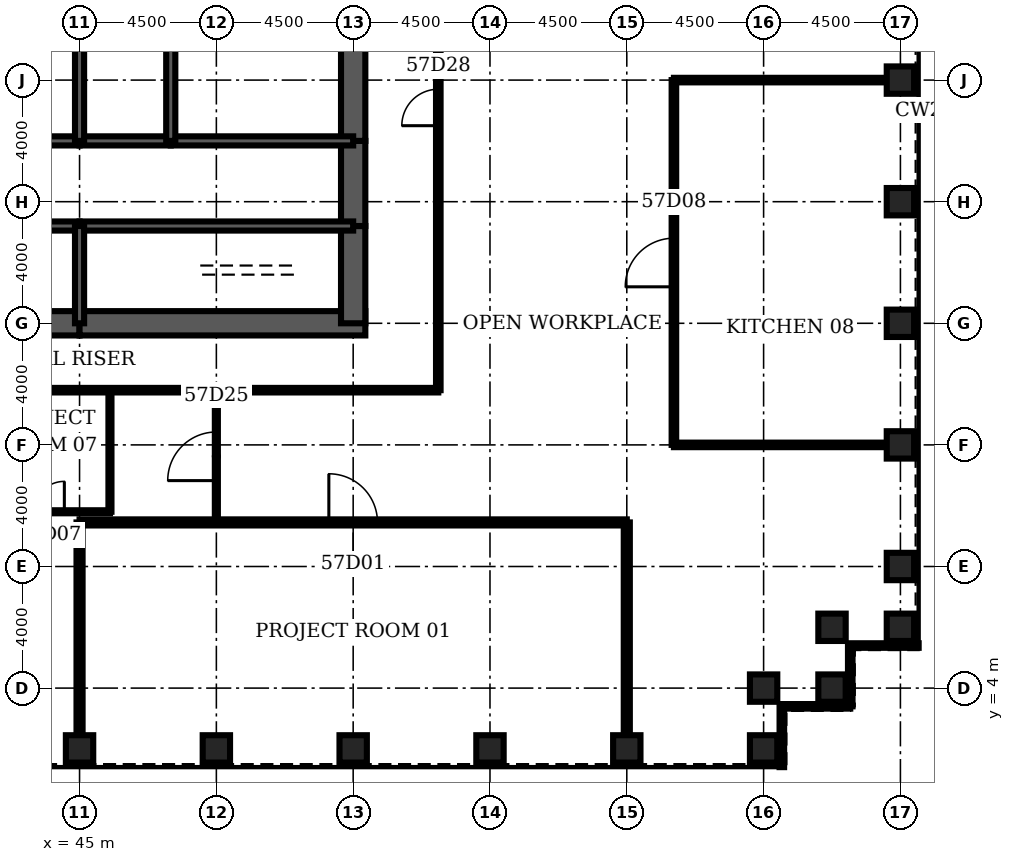
"""IFC4 building model, lengths in metres.
Left out: names, types, materials, properties, quantities, classifications, styles, units other than length and angle.
Written with IfcOpenShell. Run it as: python <this file> out.ifc"""

import sys

from ifc_helpers import new_model, si_unit, direction, frame, frame_2d, origin, origin_2d, place, context, subcontext, project, spatial, rectangle, hollow_rectangle, extrude, element, fill, save


model = new_model("IFC4")
c1 = context("Model", 3, precision=1e-05, world=origin(), true_north=direction((0.0, 1.0)))
c2 = subcontext(c1, "Body", "Model", "MODEL_VIEW")
j1 = project(units=[si_unit("LENGTHUNIT", "METRE"), si_unit("PLANEANGLEUNIT", "RADIAN")], contexts=[c1])
p1 = place(None, origin())
s1 = spatial("IfcSite", under=j1, at=p1, CompositionType="ELEMENT")
p2 = place(p1, origin())
s2 = spatial("IfcBuilding", under=s1, at=p2, CompositionType="ELEMENT")
p3 = place(p2, frame((0.0, 0.0, 253.0)))
s3 = spatial("IfcBuildingStorey", under=s2, at=p3, CompositionType="ELEMENT", Elevation=253.0)
for number, where, z_axis, x_axis in (
    (1, (45.0, 2.0, 0.0), (0.0, 0.0, 1.0), (0.0, 1.0, 0.0)),
    (2, (49.5, 2.0, 0.0), (0.0, 0.0, 1.0), (0.0, 1.0, 0.0)),
    (3, (54.0, 2.0, 0.0), (0.0, 0.0, 1.0), (0.0, 1.0, 0.0)),
    (4, (58.5, 2.0, 0.0), (0.0, 0.0, 1.0), (0.0, 1.0, 0.0)),
    (5, (63.0, 2.0, 0.0), (0.0, 0.0, 1.0), (0.0, 1.0, 0.0)),
    (6, (67.5, 2.0, 0.0), (0.0, 0.0, 1.0), (0.0, 1.0, 0.0)),
    (7, (67.5, 4.0, 0.0), (0.0, 0.0, 1.0), (0.0, 1.0, 0.0)),
    (8, (69.75, 4.0, 0.0), (0.0, 0.0, 1.0), (1.0, 0.0, 0.0)),
    (9, (69.75, 6.0, 0.0), (0.0, 0.0, 1.0), (1.0, 0.0, 0.0)),
    (10, (72.0, 6.0, 0.0), (0.0, 0.0, 1.0), (1.0, 0.0, 0.0)),
    (11, (72.0, 8.0, 0.0), (0.0, 0.0, 1.0), (1.0, 0.0, 0.0)),
    (12, (72.0, 12.0, 0.0), (0.0, 0.0, 1.0), (1.0, 0.0, 0.0)),
    (13, (72.0, 16.0, 0.0), (0.0, 0.0, 1.0), (1.0, 0.0, 0.0)),
    (14, (72.0, 20.0, 0.0), (0.0, 0.0, 1.0), (1.0, 0.0, 0.0)),
    (15, (72.0, 24.0, 0.0), (0.0, 0.0, 1.0), (1.0, 0.0, 0.0)),
):
    element("IfcColumn", number, at=place(p3, frame(where, z_axis=z_axis, x_axis=x_axis)), inside=s3, PredefinedType="COLUMN", context=c2, shape_type="SweptSolid", body=[
        extrude(hollow_rectangle(XDim=0.9, YDim=0.9, WallThickness=0.07, at=origin_2d()), origin(), (0.0, 0.0, 1.0), 4.2),
    ])
p4 = place(p3, frame((42.0, 16.0, 0.0), z_axis=(0.0, 0.0, 1.0), x_axis=(1.0, 0.0, 0.0)))
e16 = element("IfcWall", 16, at=p4, inside=s3, PredefinedType="SHEAR", context=c2, shape_type="SweptSolid", body=[
    extrude(rectangle(XDim=3.0, YDim=0.8, at=frame_2d((1.5, 0.0))), origin(), (0.0, 0.0, 1.0), 4.2),
])
p5 = place(p3, frame((45.0, 16.0, 0.0), z_axis=(0.0, 0.0, 1.0), x_axis=(1.0, 0.0, 0.0)))
e17 = element("IfcWall", 17, at=p5, inside=s3, PredefinedType="SHEAR", context=c2, shape_type="SweptSolid", body=[
    extrude(rectangle(XDim=9.4, YDim=0.8, at=frame_2d((4.7, 0.0))), origin(), (0.0, 0.0, 1.0), 4.2),
])
p6 = place(p3, frame((54.0, 16.0, 0.0), z_axis=(0.0, 0.0, 1.0), x_axis=(0.0, 1.0, 0.0)))
e18 = element("IfcWall", 18, at=p6, inside=s3, PredefinedType="SHEAR", context=c2, shape_type="SweptSolid", body=[
    extrude(rectangle(XDim=3.2, YDim=0.8, at=frame_2d((1.6, 0.0))), origin(), (0.0, 0.0, 1.0), 4.2),
])
p7 = place(p3, frame((54.0, 19.2, 0.0), z_axis=(0.0, 0.0, 1.0), x_axis=(0.0, 1.0, 0.0)))
e19 = element("IfcWall", 19, at=p7, inside=s3, PredefinedType="SHEAR", context=c2, shape_type="SweptSolid", body=[
    extrude(rectangle(XDim=2.8, YDim=0.8, at=frame_2d((1.4, 0.0))), origin(), (0.0, 0.0, 1.0), 4.2),
])
p8 = place(p7, frame((0.4, 0.0, 0.0)))
e20 = element("IfcOpeningElement", 20, at=p8, cuts=e19, PredefinedType="OPENING", context=c2, shape_type="SweptSolid", body=[
    extrude(rectangle(XDim=1.8, YDim=2.1, at=frame_2d((0.9, 1.05))), frame((0.0, 0.41, 0.0), z_axis=(0.0, -1.0, 0.0), x_axis=(1.0, 0.0, 0.0)), (0.0, 0.0, 1.0), 0.82),
])
p9 = place(p3, frame((54.0, 22.0, 0.0), z_axis=(0.0, 0.0, 1.0), x_axis=(0.0, 1.0, 0.0)))
e21 = element("IfcWall", 21, at=p9, inside=s3, PredefinedType="SHEAR", context=c2, shape_type="SweptSolid", body=[
    extrude(rectangle(XDim=4.0, YDim=0.8, at=frame_2d((2.0, 0.0))), origin(), (0.0, 0.0, 1.0), 4.2),
])
p10 = place(p3, frame((42.0, 19.2, 0.0), z_axis=(0.0, 0.0, 1.0), x_axis=(1.0, 0.0, 0.0)))
e22 = element("IfcWall", 22, at=p10, inside=s3, PredefinedType="SOLIDWALL", context=c2, shape_type="SweptSolid", body=[
    extrude(rectangle(XDim=3.0, YDim=0.3, at=frame_2d((1.5, 0.0))), origin(), (0.0, 0.0, 1.0), 4.2),
])
p11 = place(p10, frame((1.0, 0.0, 0.0)))
e23 = element("IfcOpeningElement", 23, at=p11, cuts=e22, PredefinedType="OPENING", context=c2, shape_type="SweptSolid", body=[
    extrude(rectangle(XDim=1.0, YDim=2.1, at=frame_2d((0.5, 1.05))), frame((0.0, 0.16, 0.0), z_axis=(0.0, -1.0, 0.0), x_axis=(1.0, 0.0, 0.0)), (0.0, 0.0, 1.0), 0.32),
])
p12 = place(p3, frame((45.0, 19.2, 0.0), z_axis=(0.0, 0.0, 1.0), x_axis=(1.0, 0.0, 0.0)))
e24 = element("IfcWall", 24, at=p12, inside=s3, PredefinedType="SOLIDWALL", context=c2, shape_type="SweptSolid", body=[
    extrude(rectangle(XDim=9.0, YDim=0.3, at=frame_2d((4.5, 0.0))), origin(), (0.0, 0.0, 1.0), 4.2),
])
p13 = place(p12, frame((7.35, 0.0, 0.0)))
e25 = element("IfcOpeningElement", 25, at=p13, cuts=e24, PredefinedType="OPENING", context=c2, shape_type="SweptSolid", body=[
    extrude(rectangle(XDim=1.0, YDim=2.1, at=frame_2d((0.5, 1.05))), frame((0.0, 0.16, 0.0), z_axis=(0.0, -1.0, 0.0), x_axis=(1.0, 0.0, 0.0)), (0.0, 0.0, 1.0), 0.32),
])
p14 = place(p3, frame((36.0, 22.0, 0.0), z_axis=(0.0, 0.0, 1.0), x_axis=(1.0, 0.0, 0.0)))
e26 = element("IfcWall", 26, at=p14, inside=s3, PredefinedType="SOLIDWALL", context=c2, shape_type="SweptSolid", body=[
    extrude(rectangle(XDim=9.0, YDim=0.3, at=frame_2d((4.5, 0.0))), origin(), (0.0, 0.0, 1.0), 4.2),
])
p15 = place(p14, frame((4.0, 0.0, 0.0)))
e27 = element("IfcOpeningElement", 27, at=p15, cuts=e26, PredefinedType="OPENING", context=c2, shape_type="SweptSolid", body=[
    extrude(rectangle(XDim=1.0, YDim=2.1, at=frame_2d((0.5, 1.05))), frame((0.0, 0.16, 0.0), z_axis=(0.0, -1.0, 0.0), x_axis=(1.0, 0.0, 0.0)), (0.0, 0.0, 1.0), 0.32),
])
p16 = place(p3, frame((45.0, 22.0, 0.0), z_axis=(0.0, 0.0, 1.0), x_axis=(1.0, 0.0, 0.0)))
e28 = element("IfcWall", 28, at=p16, inside=s3, PredefinedType="SOLIDWALL", context=c2, shape_type="SweptSolid", body=[
    extrude(rectangle(XDim=3.0, YDim=0.3, at=frame_2d((1.5, 0.0))), origin(), (0.0, 0.0, 1.0), 4.2),
])
p17 = place(p16, frame((1.0, 0.0, 0.0)))
e29 = element("IfcOpeningElement", 29, at=p17, cuts=e28, PredefinedType="OPENING", context=c2, shape_type="SweptSolid", body=[
    extrude(rectangle(XDim=1.0, YDim=2.1, at=frame_2d((0.5, 1.05))), frame((0.0, 0.16, 0.0), z_axis=(0.0, -1.0, 0.0), x_axis=(1.0, 0.0, 0.0)), (0.0, 0.0, 1.0), 0.32),
])
p18 = place(p3, frame((48.0, 22.0, 0.0), z_axis=(0.0, 0.0, 1.0), x_axis=(1.0, 0.0, 0.0)))
e30 = element("IfcWall", 30, at=p18, inside=s3, PredefinedType="SOLIDWALL", context=c2, shape_type="SweptSolid", body=[
    extrude(rectangle(XDim=6.0, YDim=0.3, at=frame_2d((3.0, 0.0))), origin(), (0.0, 0.0, 1.0), 4.2),
])
p19 = place(p18, frame((2.0, 0.0, 0.0)))
e31 = element("IfcOpeningElement", 31, at=p19, cuts=e30, PredefinedType="OPENING", context=c2, shape_type="SweptSolid", body=[
    extrude(rectangle(XDim=1.0, YDim=2.1, at=frame_2d((0.5, 1.05))), frame((0.0, 0.16, 0.0), z_axis=(0.0, -1.0, 0.0), x_axis=(1.0, 0.0, 0.0)), (0.0, 0.0, 1.0), 0.32),
])
p20 = place(p18, frame((4.2, 0.0, 0.0)))
e32 = element("IfcOpeningElement", 32, at=p20, cuts=e30, PredefinedType="OPENING", context=c2, shape_type="SweptSolid", body=[
    extrude(rectangle(XDim=1.0, YDim=2.1, at=frame_2d((0.5, 1.05))), frame((0.0, 0.16, 0.0), z_axis=(0.0, -1.0, 0.0), x_axis=(1.0, 0.0, 0.0)), (0.0, 0.0, 1.0), 0.32),
])
p21 = place(p3, frame((45.0, 16.0, 0.0), z_axis=(0.0, 0.0, 1.0), x_axis=(0.0, 1.0, 0.0)))
e33 = element("IfcWall", 33, at=p21, inside=s3, PredefinedType="SOLIDWALL", context=c2, shape_type="SweptSolid", body=[
    extrude(rectangle(XDim=3.2, YDim=0.3, at=frame_2d((1.6, 0.0))), origin(), (0.0, 0.0, 1.0), 4.2),
])
for number, where, z_axis, x_axis in (
    (34, (45.0, 22.0, 0.0), (0.0, 0.0, 1.0), (0.0, 1.0, 0.0)),
    (35, (48.0, 22.0, 0.0), (0.0, 0.0, 1.0), (0.0, 1.0, 0.0)),
):
    element("IfcWall", number, at=place(p3, frame(where, z_axis=z_axis, x_axis=x_axis)), inside=s3, PredefinedType="SOLIDWALL", context=c2, shape_type="SweptSolid", body=[
        extrude(rectangle(XDim=4.0, YDim=0.3, at=frame_2d((2.0, 0.0))), origin(), (0.0, 0.0, 1.0), 4.2),
    ])
p22 = place(p3, frame((42.15, 17.35, 0.0), z_axis=(0.0, 0.0, 1.0), x_axis=(1.0, 0.0, 0.0)))
e36 = element("IfcWall", 36, at=p22, inside=s3, PredefinedType="SOLIDWALL", context=c2, shape_type="SweptSolid", body=[
    extrude(rectangle(XDim=2.7, YDim=0.3, at=frame_2d((1.35, 0.0))), origin(), (0.0, 0.0, 1.0), 4.04),
])
p23 = place(p22, frame((0.85, 0.0, 0.0)))
e37 = element("IfcOpeningElement", 37, at=p23, cuts=e36, PredefinedType="OPENING", context=c2, shape_type="SweptSolid", body=[
    extrude(rectangle(XDim=1.0, YDim=2.1, at=frame_2d((0.5, 1.05))), frame((0.0, 0.16, 0.0), z_axis=(0.0, -1.0, 0.0), x_axis=(1.0, 0.0, 0.0)), (0.0, 0.0, 1.0), 0.32),
])
p24 = place(p3, frame((51.725, 22.15, 0.0), z_axis=(0.0, 0.0, 1.0), x_axis=(0.0, 1.0, 0.0)))
e38 = element("IfcWall", 38, at=p24, inside=s3, PredefinedType="PARTITIONING", context=c2, shape_type="SweptSolid", body=[
    extrude(rectangle(XDim=3.7, YDim=0.15, at=frame_2d((1.85, 0.0))), origin(), (0.0, 0.0, 1.0), 3.0),
])
p25 = place(p3, frame((45.0, 9.45, 0.0), z_axis=(0.0, 0.0, 1.0), x_axis=(1.0, 0.0, 0.0)))
e39 = element("IfcWall", 39, at=p25, inside=s3, PredefinedType="PARTITIONING", context=c2, shape_type="SweptSolid", body=[
    extrude(rectangle(XDim=18.0, YDim=0.2, at=frame_2d((9.0, 0.0))), origin(), (0.0, 0.0, 1.0), 3.0),
])
p26 = place(p25, frame((8.2, 0.0, 0.0)))
e40 = element("IfcOpeningElement", 40, at=p26, cuts=e39, PredefinedType="OPENING", context=c2, shape_type="SweptSolid", body=[
    extrude(rectangle(XDim=1.6, YDim=2.1, at=frame_2d((0.8, 1.05))), frame((0.0, 0.11, 0.0), z_axis=(0.0, -1.0, 0.0), x_axis=(1.0, 0.0, 0.0)), (0.0, 0.0, 1.0), 0.22),
])
p27 = place(p3, frame((22.0, 9.8, 0.0), z_axis=(0.0, 0.0, 1.0), x_axis=(1.0, 0.0, 0.0)))
e41 = element("IfcWall", 41, at=p27, inside=s3, PredefinedType="PARTITIONING", context=c2, shape_type="SweptSolid", body=[
    extrude(rectangle(XDim=24.0, YDim=0.1, at=frame_2d((12.0, 0.0))), origin(), (0.0, 0.0, 1.0), 3.0),
])
p28 = place(p27, frame((1.5, 0.0, 0.0)))
e42 = element("IfcOpeningElement", 42, at=p28, cuts=e41, PredefinedType="OPENING", context=c2, shape_type="SweptSolid", body=[
    extrude(rectangle(XDim=1.0, YDim=2.1, at=frame_2d((0.5, 1.05))), frame((0.0, 0.06, 0.0), z_axis=(0.0, -1.0, 0.0), x_axis=(1.0, 0.0, 0.0)), (0.0, 0.0, 1.0), 0.12),
])
p29 = place(p27, frame((5.5, 0.0, 0.0)))
e43 = element("IfcOpeningElement", 43, at=p29, cuts=e41, PredefinedType="OPENING", context=c2, shape_type="SweptSolid", body=[
    extrude(rectangle(XDim=1.0, YDim=2.1, at=frame_2d((0.5, 1.05))), frame((0.0, 0.06, 0.0), z_axis=(0.0, -1.0, 0.0), x_axis=(1.0, 0.0, 0.0)), (0.0, 0.0, 1.0), 0.12),
])
p30 = place(p27, frame((9.5, 0.0, 0.0)))
e44 = element("IfcOpeningElement", 44, at=p30, cuts=e41, PredefinedType="OPENING", context=c2, shape_type="SweptSolid", body=[
    extrude(rectangle(XDim=1.0, YDim=2.1, at=frame_2d((0.5, 1.05))), frame((0.0, 0.06, 0.0), z_axis=(0.0, -1.0, 0.0), x_axis=(1.0, 0.0, 0.0)), (0.0, 0.0, 1.0), 0.12),
])
p31 = place(p27, frame((13.5, 0.0, 0.0)))
e45 = element("IfcOpeningElement", 45, at=p31, cuts=e41, PredefinedType="OPENING", context=c2, shape_type="SweptSolid", body=[
    extrude(rectangle(XDim=1.0, YDim=2.1, at=frame_2d((0.5, 1.05))), frame((0.0, 0.06, 0.0), z_axis=(0.0, -1.0, 0.0), x_axis=(1.0, 0.0, 0.0)), (0.0, 0.0, 1.0), 0.12),
])
p32 = place(p27, frame((17.5, 0.0, 0.0)))
e46 = element("IfcOpeningElement", 46, at=p32, cuts=e41, PredefinedType="OPENING", context=c2, shape_type="SweptSolid", body=[
    extrude(rectangle(XDim=1.0, YDim=2.1, at=frame_2d((0.5, 1.05))), frame((0.0, 0.06, 0.0), z_axis=(0.0, -1.0, 0.0), x_axis=(1.0, 0.0, 0.0)), (0.0, 0.0, 1.0), 0.12),
])
p33 = place(p27, frame((21.5, 0.0, 0.0)))
e47 = element("IfcOpeningElement", 47, at=p33, cuts=e41, PredefinedType="OPENING", context=c2, shape_type="SweptSolid", body=[
    extrude(rectangle(XDim=1.0, YDim=2.1, at=frame_2d((0.5, 1.05))), frame((0.0, 0.06, 0.0), z_axis=(0.0, -1.0, 0.0), x_axis=(1.0, 0.0, 0.0)), (0.0, 0.0, 1.0), 0.12),
])
p34 = place(p3, frame((64.55, 12.0, 0.0), z_axis=(0.0, 0.0, 1.0), x_axis=(1.0, 0.0, 0.0)))
e48 = element("IfcWall", 48, at=p34, inside=s3, PredefinedType="PARTITIONING", context=c2, shape_type="SweptSolid", body=[
    extrude(rectangle(XDim=7.0, YDim=0.15, at=frame_2d((3.5, 0.0))), origin(), (0.0, 0.0, 1.0), 3.0),
])
p35 = place(p3, frame((15.2, 13.8, 0.0), z_axis=(0.0, 0.0, 1.0), x_axis=(1.0, 0.0, 0.0)))
e49 = element("IfcWall", 49, at=p35, inside=s3, PredefinedType="PARTITIONING", context=c2, shape_type="SweptSolid", body=[
    extrude(rectangle(XDim=41.6, YDim=0.15, at=frame_2d((20.8, 0.0))), origin(), (0.0, 0.0, 1.0), 3.0),
])
p36 = place(p35, frame((4.175, 0.0, 0.0)))
e50 = element("IfcOpeningElement", 50, at=p36, cuts=e49, PredefinedType="OPENING", context=c2, shape_type="SweptSolid", body=[
    extrude(rectangle(XDim=1.2, YDim=2.1, at=frame_2d((0.6, 1.05))), frame((0.0, 0.085, 0.0), z_axis=(0.0, -1.0, 0.0), x_axis=(1.0, 0.0, 0.0)), (0.0, 0.0, 1.0), 0.17),
])
p37 = place(p3, frame((64.55, 24.0, 0.0), z_axis=(0.0, 0.0, 1.0), x_axis=(1.0, 0.0, 0.0)))
e51 = element("IfcWall", 51, at=p37, inside=s3, PredefinedType="PARTITIONING", context=c2, shape_type="SweptSolid", body=[
    extrude(rectangle(XDim=7.0, YDim=0.15, at=frame_2d((3.5, 0.0))), origin(), (0.0, 0.0, 1.0), 3.0),
])
p38 = place(p3, frame((45.0, 2.45, 0.0), z_axis=(0.0, 0.0, 1.0), x_axis=(0.0, 1.0, 0.0)))
e52 = element("IfcWall", 52, at=p38, inside=s3, PredefinedType="PARTITIONING", context=c2, shape_type="SweptSolid", body=[
    extrude(rectangle(XDim=7.0, YDim=0.2, at=frame_2d((3.5, 0.0))), origin(), (0.0, 0.0, 1.0), 3.0),
])
p39 = place(p3, frame((46.0, 9.8, 0.0), z_axis=(0.0, 0.0, 1.0), x_axis=(0.0, 1.0, 0.0)))
e53 = element("IfcWall", 53, at=p39, inside=s3, PredefinedType="PARTITIONING", context=c2, shape_type="SweptSolid", body=[
    extrude(rectangle(XDim=4.0, YDim=0.1, at=frame_2d((2.0, 0.0))), origin(), (0.0, 0.0, 1.0), 3.0),
])
p40 = place(p3, frame((49.5, 9.45, 0.0), z_axis=(0.0, 0.0, 1.0), x_axis=(0.0, 1.0, 0.0)))
e54 = element("IfcWall", 54, at=p40, inside=s3, PredefinedType="PARTITIONING", context=c2, shape_type="SweptSolid", body=[
    extrude(rectangle(XDim=4.35, YDim=0.1, at=frame_2d((2.175, 0.0))), origin(), (0.0, 0.0, 1.0), 3.0),
])
p41 = place(p40, frame((1.375, 0.0, 0.0)))
e55 = element("IfcOpeningElement", 55, at=p41, cuts=e54, PredefinedType="OPENING", context=c2, shape_type="SweptSolid", body=[
    extrude(rectangle(XDim=1.6, YDim=2.1, at=frame_2d((0.8, 1.05))), frame((0.0, 0.06, 0.0), z_axis=(0.0, -1.0, 0.0), x_axis=(1.0, 0.0, 0.0)), (0.0, 0.0, 1.0), 0.12),
])
p42 = place(p3, frame((56.8, 13.8, 0.0), z_axis=(0.0, 0.0, 1.0), x_axis=(0.0, 1.0, 0.0)))
e56 = element("IfcWall", 56, at=p42, inside=s3, PredefinedType="PARTITIONING", context=c2, shape_type="SweptSolid", body=[
    extrude(rectangle(XDim=18.6, YDim=0.15, at=frame_2d((9.3, 0.0))), origin(), (0.0, 0.0, 1.0), 3.0),
])
p43 = place(p42, frame((8.7, 0.0, 0.0)))
e57 = element("IfcOpeningElement", 57, at=p43, cuts=e56, PredefinedType="OPENING", context=c2, shape_type="SweptSolid", body=[
    extrude(rectangle(XDim=1.2, YDim=2.1, at=frame_2d((0.6, 1.05))), frame((0.0, 0.085, 0.0), z_axis=(0.0, -1.0, 0.0), x_axis=(1.0, 0.0, 0.0)), (0.0, 0.0, 1.0), 0.17),
])
p44 = place(p3, frame((63.0, 2.45, 0.0), z_axis=(0.0, 0.0, 1.0), x_axis=(0.0, 1.0, 0.0)))
e58 = element("IfcWall", 58, at=p44, inside=s3, PredefinedType="PARTITIONING", context=c2, shape_type="SweptSolid", body=[
    extrude(rectangle(XDim=7.0, YDim=0.2, at=frame_2d((3.5, 0.0))), origin(), (0.0, 0.0, 1.0), 3.0),
])
p45 = place(p3, frame((64.55, 12.0, 0.0), z_axis=(0.0, 0.0, 1.0), x_axis=(0.0, 1.0, 0.0)))
e59 = element("IfcWall", 59, at=p45, inside=s3, PredefinedType="PARTITIONING", context=c2, shape_type="SweptSolid", body=[
    extrude(rectangle(XDim=12.0, YDim=0.15, at=frame_2d((6.0, 0.0))), origin(), (0.0, 0.0, 1.0), 3.0),
])
p46 = place(p45, frame((5.2, 0.0, 0.0)))
e60 = element("IfcOpeningElement", 60, at=p46, cuts=e59, PredefinedType="OPENING", context=c2, shape_type="SweptSolid", body=[
    extrude(rectangle(XDim=1.6, YDim=2.1, at=frame_2d((0.8, 1.05))), frame((0.0, 0.085, 0.0), z_axis=(0.0, -1.0, 0.0), x_axis=(1.0, 0.0, 0.0)), (0.0, 0.0, 1.0), 0.17),
])
p47 = place(p3, frame((68.1, 1.4, 0.0), z_axis=(0.0, 0.0, 1.0), x_axis=(0.0, 1.0, 0.0)))
e61 = element("IfcWall", 61, at=p47, inside=s3, PredefinedType="ELEMENTEDWALL", context=c2, shape_type="SweptSolid", body=[
    extrude(rectangle(XDim=2.0, YDim=0.15, at=frame_2d((1.0, 0.0))), origin(), (0.0, 0.0, 1.0), 4.04),
])
p48 = place(p3, frame((68.1, 3.4, 0.0), z_axis=(0.0, 0.0, 1.0), x_axis=(1.0, 0.0, 0.0)))
e62 = element("IfcWall", 62, at=p48, inside=s3, PredefinedType="ELEMENTEDWALL", context=c2, shape_type="SweptSolid", body=[
    extrude(rectangle(XDim=2.25, YDim=0.15, at=frame_2d((1.125, 0.0))), origin(), (0.0, 0.0, 1.0), 4.04),
])
p49 = place(p3, frame((70.35, 3.4, 0.0), z_axis=(0.0, 0.0, 1.0), x_axis=(0.0, 1.0, 0.0)))
e63 = element("IfcWall", 63, at=p49, inside=s3, PredefinedType="ELEMENTEDWALL", context=c2, shape_type="SweptSolid", body=[
    extrude(rectangle(XDim=2.0, YDim=0.15, at=frame_2d((1.0, 0.0))), origin(), (0.0, 0.0, 1.0), 4.04),
])
p50 = place(p3, frame((70.35, 5.4, 0.0), z_axis=(0.0, 0.0, 1.0), x_axis=(1.0, 0.0, 0.0)))
e64 = element("IfcWall", 64, at=p50, inside=s3, PredefinedType="ELEMENTEDWALL", context=c2, shape_type="SweptSolid", body=[
    extrude(rectangle(XDim=2.25, YDim=0.15, at=frame_2d((1.125, 0.0))), origin(), (0.0, 0.0, 1.0), 4.04),
])
p51 = place(p26, origin())
e65 = element("IfcDoor", 65, at=p51, inside=s3, OperationType="SINGLE_SWING_LEFT", PredefinedType="DOOR", context=c2, shape_type="SweptSolid", body=[
    extrude(rectangle(XDim=1.6, YDim=2.1, at=frame_2d((0.8, 1.05))), frame((0.0, 0.025, 0.0), z_axis=(0.0, -1.0, 0.0), x_axis=(1.0, 0.0, 0.0)), (0.0, 0.0, 1.0), 0.05),
])
fill(e40, e65)
p52 = place(p33, origin())
e66 = element("IfcDoor", 66, at=p52, inside=s3, OperationType="SINGLE_SWING_RIGHT", PredefinedType="DOOR", context=c2, shape_type="SweptSolid", body=[
    extrude(rectangle(XDim=1.0, YDim=2.1, at=frame_2d((0.5, 1.05))), frame((0.0, 0.025, 0.0), z_axis=(0.0, -1.0, 0.0), x_axis=(1.0, 0.0, 0.0)), (0.0, 0.0, 1.0), 0.05),
])
fill(e47, e66)
p53 = place(p46, origin())
e67 = element("IfcDoor", 67, at=p53, inside=s3, OperationType="SINGLE_SWING_LEFT", PredefinedType="DOOR", context=c2, shape_type="SweptSolid", body=[
    extrude(rectangle(XDim=1.6, YDim=2.1, at=frame_2d((0.8, 1.05))), frame((0.0, 0.025, 0.0), z_axis=(0.0, -1.0, 0.0), x_axis=(1.0, 0.0, 0.0)), (0.0, 0.0, 1.0), 0.05),
])
fill(e60, e67)
p54 = place(p41, origin())
e68 = element("IfcDoor", 68, at=p54, inside=s3, OperationType="SINGLE_SWING_LEFT", PredefinedType="DOOR", context=c2, shape_type="SweptSolid", body=[
    extrude(rectangle(XDim=1.6, YDim=2.1, at=frame_2d((0.8, 1.05))), frame((0.0, 0.025, 0.0), z_axis=(0.0, -1.0, 0.0), x_axis=(1.0, 0.0, 0.0)), (0.0, 0.0, 1.0), 0.05),
])
fill(e55, e68)
p55 = place(p43, origin())
e69 = element("IfcDoor", 69, at=p55, inside=s3, OperationType="SINGLE_SWING_LEFT", PredefinedType="DOOR", context=c2, shape_type="SweptSolid", body=[
    extrude(rectangle(XDim=1.2, YDim=2.1, at=frame_2d((0.6, 1.05))), frame((0.0, 0.025, 0.0), z_axis=(0.0, -1.0, 0.0), x_axis=(1.0, 0.0, 0.0)), (0.0, 0.0, 1.0), 0.05),
])
fill(e57, e69)
p56 = place(p13, origin())
e70 = element("IfcDoor", 70, at=p56, inside=s3, OperationType="SINGLE_SWING_RIGHT", PredefinedType="DOOR", context=c2, shape_type="SweptSolid", body=[
    extrude(rectangle(XDim=1.0, YDim=2.1, at=frame_2d((0.5, 1.05))), frame((0.0, 0.025, 0.0), z_axis=(0.0, -1.0, 0.0), x_axis=(1.0, 0.0, 0.0)), (0.0, 0.0, 1.0), 0.05),
])
fill(e25, e70)
p57 = place(p8, origin())
e71 = element("IfcDoor", 71, at=p57, inside=s3, OperationType="SINGLE_SWING_LEFT", PredefinedType="DOOR", context=c2, shape_type="SweptSolid", body=[
    extrude(rectangle(XDim=1.8, YDim=2.1, at=frame_2d((0.9, 1.05))), frame((0.0, 0.4, 0.0), z_axis=(0.0, -1.0, 0.0), x_axis=(1.0, 0.0, 0.0)), (0.0, 0.0, 1.0), 0.8),
])
fill(e20, e71)
p58 = place(p17, origin())
e72 = element("IfcDoor", 72, at=p58, inside=s3, OperationType="SINGLE_SWING_LEFT", PredefinedType="DOOR", context=c2, shape_type="SweptSolid", body=[
    extrude(rectangle(XDim=1.0, YDim=2.1, at=frame_2d((0.5, 1.05))), frame((0.0, 0.025, 0.0), z_axis=(0.0, -1.0, 0.0), x_axis=(1.0, 0.0, 0.0)), (0.0, 0.0, 1.0), 0.05),
])
fill(e29, e72)
p59 = place(p19, origin())
e73 = element("IfcDoor", 73, at=p59, inside=s3, OperationType="SINGLE_SWING_LEFT", PredefinedType="DOOR", context=c2, shape_type="SweptSolid", body=[
    extrude(rectangle(XDim=1.0, YDim=2.1, at=frame_2d((0.5, 1.05))), frame((0.0, 0.025, 0.0), z_axis=(0.0, -1.0, 0.0), x_axis=(1.0, 0.0, 0.0)), (0.0, 0.0, 1.0), 0.05),
])
fill(e31, e73)
p60 = place(p20, origin())
e74 = element("IfcDoor", 74, at=p60, inside=s3, OperationType="SINGLE_SWING_RIGHT", PredefinedType="DOOR", context=c2, shape_type="SweptSolid", body=[
    extrude(rectangle(XDim=1.0, YDim=2.1, at=frame_2d((0.5, 1.05))), frame((0.0, 0.025, 0.0), z_axis=(0.0, -1.0, 0.0), x_axis=(1.0, 0.0, 0.0)), (0.0, 0.0, 1.0), 0.05),
])
fill(e32, e74)
save(model, sys.argv[1])
